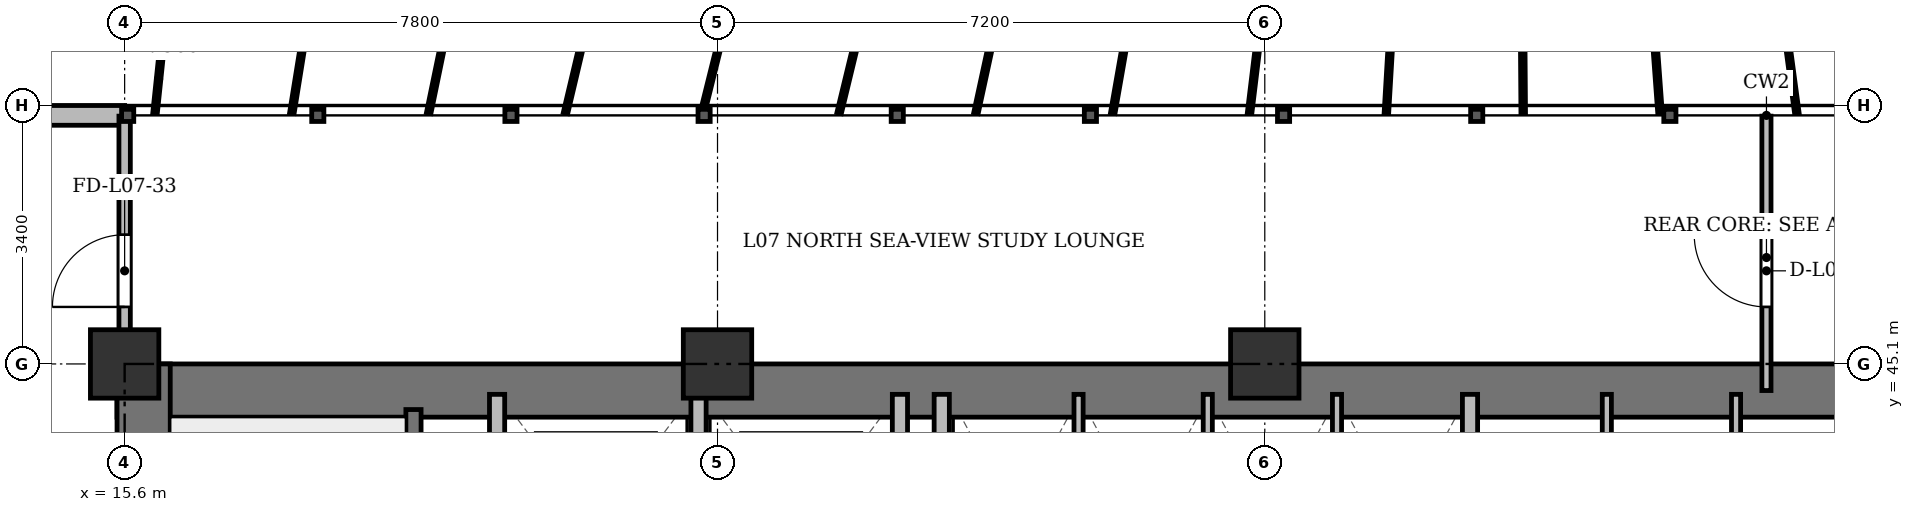
"""IFC4 building model, lengths in metres.
Left out: names, types, materials, properties, quantities, classifications, styles, units other than length and angle.
Written with IfcOpenShell. Run it as: python <this file> out.ifc"""

import sys

from ifc_helpers import new_model, si_unit, direction, frame, frame_2d, origin, origin_2d, place, context, subcontext, project, spatial, rectangle, extrude, source, transform, mapped, element, fill, save


model = new_model("IFC4")
c1 = context("Model", 3, precision=1e-05, world=origin(), true_north=direction((0.0, 1.0)))
c2 = subcontext(c1, "Body", "Model", "MODEL_VIEW")
j1 = project(units=[si_unit("LENGTHUNIT", "METRE"), si_unit("PLANEANGLEUNIT", "RADIAN")], contexts=[c1])
p1 = place(None, origin())
s1 = spatial("IfcSite", under=j1, at=p1, CompositionType="ELEMENT")
p2 = place(p1, origin())
s2 = spatial("IfcBuilding", under=s1, at=p2, CompositionType="ELEMENT")
p3 = place(p2, frame((0.0, 0.0, 30.7)))
s3 = spatial("IfcBuildingStorey", under=s2, at=p3, CompositionType="ELEMENT", Elevation=30.7)
m1 = source(origin(), c2, "Body", "SweptSolid", [
    extrude(rectangle(XDim=0.9, YDim=0.9, at=origin_2d()), origin(), (0.0, 0.0, 1.0), 3.6),
])
for number, where, z_axis, x_axis in (
    (1, (15.6, 45.1, 0.0), (0.0, 0.0, 1.0), (1.0, 0.0, 0.0)),
    (2, (23.4, 45.1, 0.0), (0.0, 0.0, 1.0), (1.0, 0.0, 0.0)),
    (3, (30.6, 45.1, 0.0), (0.0, 0.0, 1.0), (1.0, 0.0, 0.0)),
):
    element("IfcColumn", number, at=place(p3, frame(where, z_axis=z_axis, x_axis=x_axis)), inside=s3, PredefinedType="COLUMN", context=c2, shape_type="MappedRepresentation", body=[
        mapped(m1, transform((0.0, 0.0, 0.0), x_axis=(1.0, 0.0, 0.0), y_axis=(0.0, 1.0, 0.0), z_axis=(0.0, 0.0, 1.0), scale=1.0)),
    ])
p4 = place(p3, frame((7.6, 48.37, 0.0), z_axis=(0.0, 0.0, 1.0), x_axis=(1.0, 0.0, 0.0)))
e4 = element("IfcWall", 4, at=p4, inside=s3, PredefinedType="SOLIDWALL", context=c2, shape_type="SweptSolid", body=[
    extrude(rectangle(XDim=8.0, YDim=0.26, at=frame_2d((4.0, 0.0))), origin(), (0.0, 0.0, 1.0), 3.34),
])
p5 = place(p4, frame((0.768, 0.0, 0.9)))
e5 = element("IfcOpeningElement", 5, at=p5, cuts=e4, PredefinedType="OPENING", context=c2, shape_type="SweptSolid", body=[
    extrude(rectangle(XDim=1.2, YDim=1.65, at=frame_2d((0.6, 0.825))), frame((0.0, 0.14, 0.0), z_axis=(0.0, -1.0, 0.0), x_axis=(1.0, 0.0, 0.0)), (0.0, 0.0, 1.0), 0.28),
])
p6 = place(p4, frame((4.441, 0.0, 0.9)))
e6 = element("IfcOpeningElement", 6, at=p6, cuts=e4, PredefinedType="OPENING", context=c2, shape_type="SweptSolid", body=[
    extrude(rectangle(XDim=1.35, YDim=1.5, at=frame_2d((0.675, 0.75))), frame((0.0, 0.14, 0.0), z_axis=(0.0, -1.0, 0.0), x_axis=(1.0, 0.0, 0.0)), (0.0, 0.0, 1.0), 0.28),
])
p7 = place(p3, frame((15.5, 44.75, 0.0), z_axis=(0.0, 0.0, 1.0), x_axis=(1.0, 0.0, 0.0)))
e7 = element("IfcWall", 7, at=p7, inside=s3, PredefinedType="SHEAR", context=c2, shape_type="SweptSolid", body=[
    extrude(rectangle(XDim=43.4, YDim=0.7, at=frame_2d((21.7, 0.0))), origin(), (0.0, 0.0, 1.0), 3.34),
])
p8 = place(p3, frame((15.85, 33.4, 0.0), z_axis=(0.0, 0.0, 1.0), x_axis=(0.0, 1.0, 0.0)))
e8 = element("IfcWall", 8, at=p8, inside=s3, PredefinedType="SHEAR", context=c2, shape_type="SweptSolid", body=[
    extrude(rectangle(XDim=11.7, YDim=0.7, at=frame_2d((5.85, 0.0))), origin(), (0.0, 0.0, 1.0), 3.34),
])
p9 = place(p3, frame((19.4, 33.4, 0.0), z_axis=(0.0, 0.0, 1.0), x_axis=(0.0, 1.0, 0.0)))
e9 = element("IfcWall", 9, at=p9, inside=s3, PredefinedType="SHEAR", context=c2, shape_type="SweptSolid", body=[
    extrude(rectangle(XDim=11.1, YDim=0.2, at=frame_2d((5.55, 0.0))), origin(), (0.0, 0.0, 1.0), 3.34),
])
p10 = place(p9, frame((0.85, 0.0, 0.0)))
e10 = element("IfcOpeningElement", 10, at=p10, cuts=e9, PredefinedType="OPENING", context=c2, shape_type="SweptSolid", body=[
    extrude(rectangle(XDim=1.1, YDim=2.15, at=frame_2d((0.55, 1.075))), frame((0.0, 0.11, 0.0), z_axis=(0.0, -1.0, 0.0), x_axis=(1.0, 0.0, 0.0)), (0.0, 0.0, 1.0), 0.22),
])
for number, where, z_axis, x_axis in (
    (11, (20.5, 41.3, 0.0), (0.0, 0.0, 1.0), (0.0, 1.0, 0.0)),
    (12, (23.15, 41.3, 0.0), (0.0, 0.0, 1.0), (0.0, 1.0, 0.0)),
    (13, (25.8, 41.3, 0.0), (0.0, 0.0, 1.0), (0.0, 1.0, 0.0)),
):
    element("IfcWall", number, at=place(p3, frame(where, z_axis=z_axis, x_axis=x_axis)), inside=s3, PredefinedType="SOLIDWALL", context=c2, shape_type="SweptSolid", body=[
        extrude(rectangle(XDim=3.4, YDim=0.2, at=frame_2d((1.7, 0.0))), origin(), (0.0, 0.0, 1.0), 3.34),
    ])
p11 = place(p3, frame((26.35, 33.4, 0.0), z_axis=(0.0, 0.0, 1.0), x_axis=(0.0, 1.0, 0.0)))
e14 = element("IfcWall", 14, at=p11, inside=s3, PredefinedType="SOLIDWALL", context=c2, shape_type="SweptSolid", body=[
    extrude(rectangle(XDim=11.3, YDim=0.2, at=frame_2d((5.65, 0.0))), origin(), (0.0, 0.0, 1.0), 2.69),
])
p12 = place(p3, frame((33.3, 41.5, 0.0), z_axis=(0.0, 0.0, 1.0), x_axis=(0.0, 1.0, 0.0)))
e15 = element("IfcWall", 15, at=p12, inside=s3, PredefinedType="SOLIDWALL", context=c2, shape_type="SweptSolid", body=[
    extrude(rectangle(XDim=3.2, YDim=0.2, at=frame_2d((1.6, 0.0))), origin(), (0.0, 0.0, 1.0), 3.34),
])
for number, where, z_axis, x_axis in (
    (16, (28.15, 41.5, 0.0), (0.0, 0.0, 1.0), (0.0, 1.0, 0.0)),
    (17, (29.85, 41.5, 0.0), (0.0, 0.0, 1.0), (0.0, 1.0, 0.0)),
    (18, (31.55, 41.5, 0.0), (0.0, 0.0, 1.0), (0.0, 1.0, 0.0)),
    (19, (35.1, 41.5, 0.0), (0.0, 0.0, 1.0), (0.0, 1.0, 0.0)),
    (20, (36.8, 41.5, 0.0), (0.0, 0.0, 1.0), (0.0, 1.0, 0.0)),
):
    element("IfcWall", number, at=place(p3, frame(where, z_axis=z_axis, x_axis=x_axis)), inside=s3, PredefinedType="PARTITIONING", context=c2, shape_type="SweptSolid", body=[
        extrude(rectangle(XDim=3.2, YDim=0.12, at=frame_2d((1.6, 0.0))), origin(), (0.0, 0.0, 1.0), 3.34),
    ])
p13 = place(p3, frame((37.2, 44.75, 0.0), z_axis=(0.0, 0.0, 1.0), x_axis=(0.0, 1.0, 0.0)))
e21 = element("IfcWall", 21, at=p13, inside=s3, PredefinedType="PARTITIONING", context=c2, shape_type="SweptSolid", body=[
    extrude(rectangle(XDim=3.61, YDim=0.12, at=frame_2d((1.805, 0.0))), origin(), (0.0, 0.0, 1.0), 2.69),
])
p14 = place(p13, frame((1.1, 0.0, 0.0)))
e22 = element("IfcOpeningElement", 22, at=p14, cuts=e21, PredefinedType="OPENING", context=c2, shape_type="SweptSolid", body=[
    extrude(rectangle(XDim=0.95, YDim=2.15, at=frame_2d((0.475, 1.075))), frame((0.0, 0.07, 0.0), z_axis=(0.0, -1.0, 0.0), x_axis=(1.0, 0.0, 0.0)), (0.0, 0.0, 1.0), 0.14),
])
p15 = place(p3, frame((15.6, 44.75, 0.0), z_axis=(0.0, 0.0, 1.0), x_axis=(0.0, 1.0, 0.0)))
e23 = element("IfcWall", 23, at=p15, inside=s3, PredefinedType="PARTITIONING", context=c2, shape_type="SweptSolid", body=[
    extrude(rectangle(XDim=3.61, YDim=0.15, at=frame_2d((1.805, 0.0))), origin(), (0.0, 0.0, 1.0), 2.752),
])
p16 = place(p15, frame((1.1, 0.0, 0.0)))
e24 = element("IfcOpeningElement", 24, at=p16, cuts=e23, PredefinedType="OPENING", context=c2, shape_type="SweptSolid", body=[
    extrude(rectangle(XDim=0.95, YDim=2.15, at=frame_2d((0.475, 1.075))), frame((0.0, 0.085, 0.0), z_axis=(0.0, -1.0, 0.0), x_axis=(1.0, 0.0, 0.0)), (0.0, 0.0, 1.0), 0.17),
])
m2 = source(origin(), c2, "Body", "SweptSolid", [
    extrude(rectangle(XDim=0.95, YDim=2.15, at=frame_2d((0.475, 1.075))), frame((0.0, 0.025, 0.0), z_axis=(0.0, -1.0, 0.0), x_axis=(1.0, 0.0, 0.0)), (0.0, 0.0, 1.0), 0.05),
])
p17 = place(p14, origin())
e25 = element("IfcDoor", 25, at=p17, inside=s3, OperationType="SINGLE_SWING_RIGHT", PredefinedType="DOOR", context=c2, shape_type="MappedRepresentation", body=[
    mapped(m2, transform((0.0, 0.0, 0.0), x_axis=(1.0, 0.0, 0.0), y_axis=(0.0, 1.0, 0.0), z_axis=(0.0, 0.0, 1.0), scale=1.0)),
])
fill(e22, e25)
p18 = place(p16, origin())
e26 = element("IfcDoor", 26, at=p18, inside=s3, OperationType="SINGLE_SWING_LEFT", PredefinedType="DOOR", context=c2, shape_type="MappedRepresentation", body=[
    mapped(m2, transform((0.0, 0.0, 0.0), x_axis=(1.0, 0.0, 0.0), y_axis=(0.0, 1.0, 0.0), z_axis=(0.0, 0.0, 1.0), scale=1.0)),
])
fill(e24, e26)
save(model, sys.argv[1])
